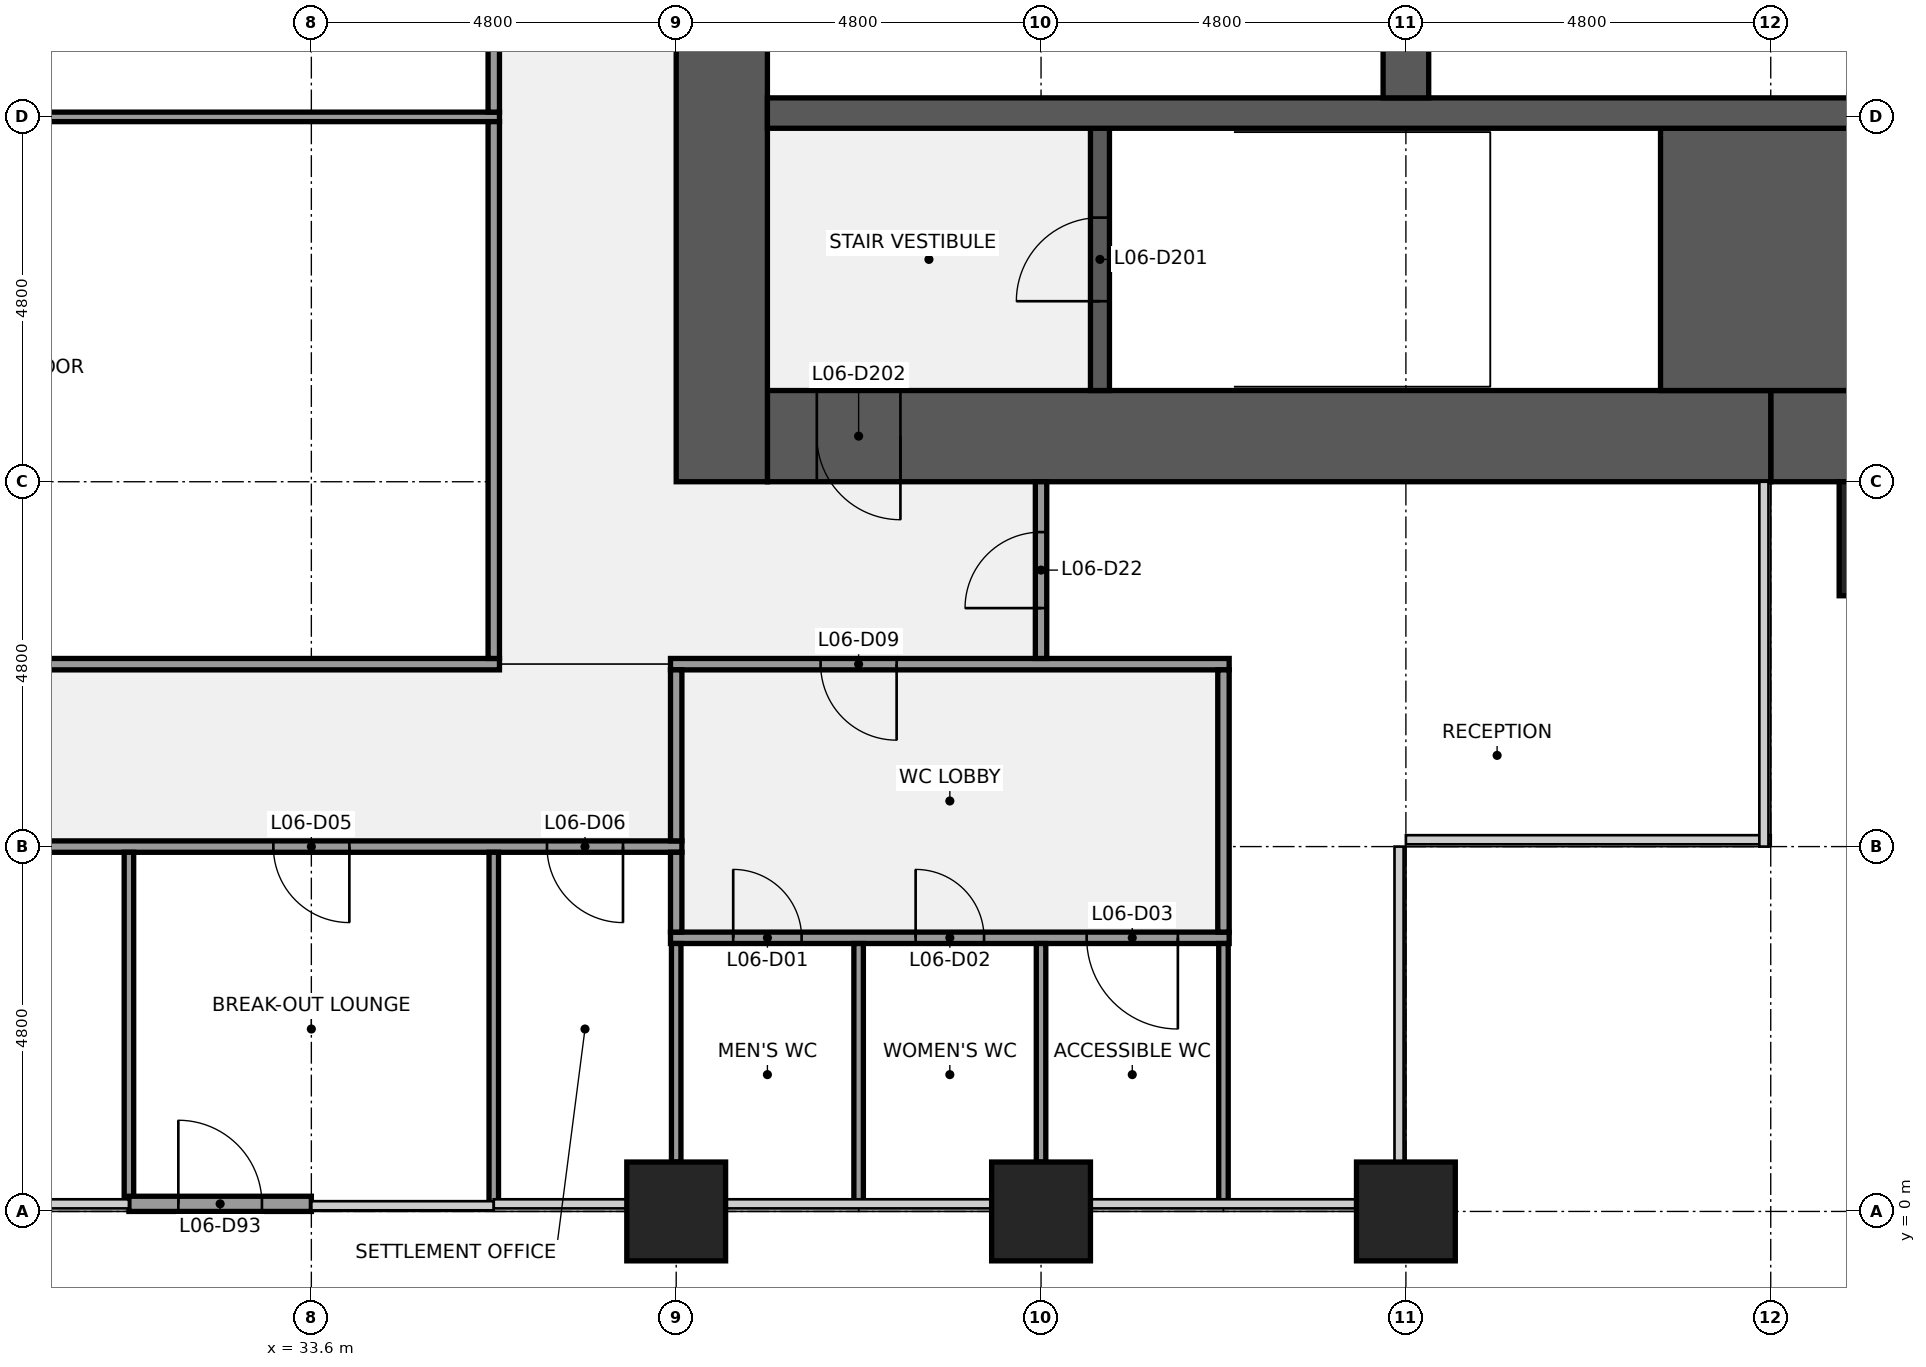
"""IFC4 building model, lengths in metres.
Left out: names, types, materials, properties, quantities, classifications, styles, units other than length and angle.
Written with IfcOpenShell. Run it as: python <this file> out.ifc"""

import sys

from ifc_helpers import new_model, si_unit, direction, frame, frame_2d, origin, origin_2d, place, context, subcontext, project, spatial, rectangle, extrude, element, fill, save


model = new_model("IFC4")
c1 = context("Model", 3, precision=1e-05, world=origin(), true_north=direction((0.0, 1.0)))
c2 = subcontext(c1, "Body", "Model", "MODEL_VIEW")
j1 = project(units=[si_unit("LENGTHUNIT", "METRE"), si_unit("PLANEANGLEUNIT", "RADIAN")], contexts=[c1])
p1 = place(None, origin())
s1 = spatial("IfcSite", under=j1, at=p1, CompositionType="ELEMENT")
p2 = place(p1, origin())
s2 = spatial("IfcBuilding", under=s1, at=p2, CompositionType="ELEMENT")
p3 = place(p2, frame((0.0, 0.0, 34.6)))
s3 = spatial("IfcBuildingStorey", under=s2, at=p3, CompositionType="ELEMENT", Elevation=34.6)
for number, where, z_axis, x_axis in (
    (1, (38.4, 0.0, 0.0), (0.0, 0.0, 1.0), (1.0, 0.0, 0.0)),
    (2, (43.2, 0.0, 0.0), (0.0, 0.0, 1.0), (1.0, 0.0, 0.0)),
    (3, (48.0, 0.0, 0.0), (0.0, 0.0, 1.0), (1.0, 0.0, 0.0)),
):
    element("IfcColumn", number, at=place(p3, frame(where, z_axis=z_axis, x_axis=x_axis)), inside=s3, PredefinedType="COLUMN", context=c2, shape_type="SweptSolid", body=[
        extrude(rectangle(XDim=1.3, YDim=1.3, at=origin_2d()), origin(), (0.0, 0.0, 1.0), 4.4),
    ])
p4 = place(p3, frame((56.4, 10.2, 0.0), z_axis=(0.0, 0.0, 1.0), x_axis=(-1.0, 0.0, 0.0)))
e4 = element("IfcWall", 4, at=p4, inside=s3, PredefinedType="SHEAR", context=c2, shape_type="SweptSolid", body=[
    extrude(rectangle(XDim=3.6, YDim=1.2, at=frame_2d((1.8, 0.0))), origin(), (0.0, 0.0, 1.0), 4.24),
])
p5 = place(p3, frame((52.8, 10.2, 0.0), z_axis=(0.0, 0.0, 1.0), x_axis=(-1.0, 0.0, 0.0)))
e5 = element("IfcWall", 5, at=p5, inside=s3, PredefinedType="SHEAR", context=c2, shape_type="SweptSolid", body=[
    extrude(rectangle(XDim=13.2, YDim=1.2, at=frame_2d((6.6, 0.0))), origin(), (0.0, 0.0, 1.0), 4.24),
])
p6 = place(p5, frame((11.45, 0.0, 0.0)))
e6 = element("IfcOpeningElement", 6, at=p6, cuts=e5, PredefinedType="OPENING", context=c2, shape_type="SweptSolid", body=[
    extrude(rectangle(XDim=1.1, YDim=2.1, at=frame_2d((0.55, 1.05))), frame((0.0, 0.61, 0.0), z_axis=(0.0, -1.0, 0.0), x_axis=(1.0, 0.0, 0.0)), (0.0, 0.0, 1.0), 1.22),
])
p7 = place(p3, frame((39.0, 9.6, 0.0), z_axis=(0.0, 0.0, 1.0), x_axis=(0.0, 1.0, 0.0)))
e7 = element("IfcWall", 7, at=p7, inside=s3, PredefinedType="SHEAR", context=c2, shape_type="SweptSolid", body=[
    extrude(rectangle(XDim=28.8, YDim=1.2, at=frame_2d((14.4, 0.0))), origin(), (0.0, 0.0, 1.0), 4.24),
])
p8 = place(p7, frame((8.7, 0.0, 0.0)))
e8 = element("IfcOpeningElement", 8, at=p8, cuts=e7, PredefinedType="OPENING", context=c2, shape_type="SweptSolid", body=[
    extrude(rectangle(XDim=1.8, YDim=2.1, at=frame_2d((0.9, 1.05))), frame((0.0, 0.61, 0.0), z_axis=(0.0, -1.0, 0.0), x_axis=(1.0, 0.0, 0.0)), (0.0, 0.0, 1.0), 1.22),
])
p9 = place(p7, frame((18.3, 0.0, 0.0)))
e9 = element("IfcOpeningElement", 9, at=p9, cuts=e7, PredefinedType="OPENING", context=c2, shape_type="SweptSolid", body=[
    extrude(rectangle(XDim=1.8, YDim=2.1, at=frame_2d((0.9, 1.05))), frame((0.0, 0.61, 0.0), z_axis=(0.0, -1.0, 0.0), x_axis=(1.0, 0.0, 0.0)), (0.0, 0.0, 1.0), 1.22),
])
p10 = place(p3, frame((51.35, 12.525, 0.0), z_axis=(0.0, 0.0, 1.0), x_axis=(1.0, 0.0, 0.0)))
e10 = element("IfcWall", 10, at=p10, inside=s3, PredefinedType="SHEAR", context=c2, shape_type="SweptSolid", body=[
    extrude(rectangle(XDim=5.05, YDim=3.45, at=frame_2d((2.525, 0.0))), origin(), (0.0, 0.0, 1.0), 4.24),
])
p11 = place(p3, frame((43.975, 10.8, 0.0), z_axis=(0.0, 0.0, 1.0), x_axis=(0.0, 1.0, 0.0)))
e11 = element("IfcWall", 11, at=p11, inside=s3, PredefinedType="SHEAR", context=c2, shape_type="SweptSolid", body=[
    extrude(rectangle(XDim=3.45, YDim=0.25, at=frame_2d((1.725, 0.0))), origin(), (0.0, 0.0, 1.0), 4.24),
])
p12 = place(p11, frame((1.175, 0.0, 0.0)))
e12 = element("IfcOpeningElement", 12, at=p12, cuts=e11, PredefinedType="OPENING", context=c2, shape_type="SweptSolid", body=[
    extrude(rectangle(XDim=1.1, YDim=2.1, at=frame_2d((0.55, 1.05))), frame((0.0, 0.135, 0.0), z_axis=(0.0, -1.0, 0.0), x_axis=(1.0, 0.0, 0.0)), (0.0, 0.0, 1.0), 0.27),
])
p13 = place(p3, frame((39.6, 14.45, 0.0), z_axis=(0.0, 0.0, 1.0), x_axis=(1.0, 0.0, 0.0)))
e13 = element("IfcWall", 13, at=p13, inside=s3, PredefinedType="SHEAR", context=c2, shape_type="SweptSolid", body=[
    extrude(rectangle(XDim=16.8, YDim=0.4, at=frame_2d((8.4, 0.0))), origin(), (0.0, 0.0, 1.0), 4.24),
])
p14 = place(p3, frame((48.0, 14.65, 0.0), z_axis=(0.0, 0.0, 1.0), x_axis=(0.0, 1.0, 0.0)))
e14 = element("IfcWall", 14, at=p14, inside=s3, PredefinedType="SHEAR", context=c2, shape_type="SweptSolid", body=[
    extrude(rectangle(XDim=2.6, YDim=0.6, at=frame_2d((1.3, 0.0))), origin(), (0.0, 0.0, 1.0), 4.24),
])
p15 = place(p3, frame((38.325, 3.6, 0.0), z_axis=(0.0, 0.0, 1.0), x_axis=(1.0, 0.0, 0.0)))
e15 = element("IfcWall", 15, at=p15, inside=s3, PredefinedType="PARTITIONING", context=c2, shape_type="SweptSolid", body=[
    extrude(rectangle(XDim=7.35, YDim=0.15, at=frame_2d((3.675, 0.0))), origin(), (0.0, 0.0, 1.0), 3.27),
])
p16 = place(p15, frame((0.825, 0.0, 0.0)))
e16 = element("IfcOpeningElement", 16, at=p16, cuts=e15, PredefinedType="OPENING", context=c2, shape_type="SweptSolid", body=[
    extrude(rectangle(XDim=0.9, YDim=2.1, at=frame_2d((0.45, 1.05))), frame((0.0, 0.085, 0.0), z_axis=(0.0, -1.0, 0.0), x_axis=(1.0, 0.0, 0.0)), (0.0, 0.0, 1.0), 0.17),
])
p17 = place(p15, frame((3.225, 0.0, 0.0)))
e17 = element("IfcOpeningElement", 17, at=p17, cuts=e15, PredefinedType="OPENING", context=c2, shape_type="SweptSolid", body=[
    extrude(rectangle(XDim=0.9, YDim=2.1, at=frame_2d((0.45, 1.05))), frame((0.0, 0.085, 0.0), z_axis=(0.0, -1.0, 0.0), x_axis=(1.0, 0.0, 0.0)), (0.0, 0.0, 1.0), 0.17),
])
p18 = place(p15, frame((5.475, 0.0, 0.0)))
e18 = element("IfcOpeningElement", 18, at=p18, cuts=e15, PredefinedType="OPENING", context=c2, shape_type="SweptSolid", body=[
    extrude(rectangle(XDim=1.2, YDim=2.1, at=frame_2d((0.6, 1.05))), frame((0.0, 0.085, 0.0), z_axis=(0.0, -1.0, 0.0), x_axis=(1.0, 0.0, 0.0)), (0.0, 0.0, 1.0), 0.17),
])
p19 = place(p3, frame((19.125, 4.8, 0.0), z_axis=(0.0, 0.0, 1.0), x_axis=(1.0, 0.0, 0.0)))
e19 = element("IfcWall", 19, at=p19, inside=s3, PredefinedType="PARTITIONING", context=c2, shape_type="SweptSolid", body=[
    extrude(rectangle(XDim=19.35, YDim=0.15, at=frame_2d((9.675, 0.0))), origin(), (0.0, 0.0, 1.0), 3.27),
])
p20 = place(p19, frame((5.575, 0.0, 0.0)))
e20 = element("IfcOpeningElement", 20, at=p20, cuts=e19, PredefinedType="OPENING", context=c2, shape_type="SweptSolid", body=[
    extrude(rectangle(XDim=1.0, YDim=2.1, at=frame_2d((0.5, 1.05))), frame((0.0, 0.085, 0.0), z_axis=(0.0, -1.0, 0.0), x_axis=(1.0, 0.0, 0.0)), (0.0, 0.0, 1.0), 0.17),
])
p21 = place(p19, frame((13.975, 0.0, 0.0)))
e21 = element("IfcOpeningElement", 21, at=p21, cuts=e19, PredefinedType="OPENING", context=c2, shape_type="SweptSolid", body=[
    extrude(rectangle(XDim=1.0, YDim=2.1, at=frame_2d((0.5, 1.05))), frame((0.0, 0.085, 0.0), z_axis=(0.0, -1.0, 0.0), x_axis=(1.0, 0.0, 0.0)), (0.0, 0.0, 1.0), 0.17),
])
p22 = place(p19, frame((17.575, 0.0, 0.0)))
e22 = element("IfcOpeningElement", 22, at=p22, cuts=e19, PredefinedType="OPENING", context=c2, shape_type="SweptSolid", body=[
    extrude(rectangle(XDim=1.0, YDim=2.1, at=frame_2d((0.5, 1.05))), frame((0.0, 0.085, 0.0), z_axis=(0.0, -1.0, 0.0), x_axis=(1.0, 0.0, 0.0)), (0.0, 0.0, 1.0), 0.17),
])
p23 = place(p3, frame((21.525, 7.2, 0.0), z_axis=(0.0, 0.0, 1.0), x_axis=(1.0, 0.0, 0.0)))
e23 = element("IfcWall", 23, at=p23, inside=s3, PredefinedType="PARTITIONING", context=c2, shape_type="SweptSolid", body=[
    extrude(rectangle(XDim=14.55, YDim=0.15, at=frame_2d((7.275, 0.0))), origin(), (0.0, 0.0, 1.0), 3.27),
])
p24 = place(p23, frame((6.775, 0.0, 0.0)))
e24 = element("IfcOpeningElement", 24, at=p24, cuts=e23, PredefinedType="OPENING", context=c2, shape_type="SweptSolid", body=[
    extrude(rectangle(XDim=1.0, YDim=2.1, at=frame_2d((0.5, 1.05))), frame((0.0, 0.085, 0.0), z_axis=(0.0, -1.0, 0.0), x_axis=(1.0, 0.0, 0.0)), (0.0, 0.0, 1.0), 0.17),
])
p25 = place(p3, frame((38.325, 7.2, 0.0), z_axis=(0.0, 0.0, 1.0), x_axis=(1.0, 0.0, 0.0)))
e25 = element("IfcWall", 25, at=p25, inside=s3, PredefinedType="PARTITIONING", context=c2, shape_type="SweptSolid", body=[
    extrude(rectangle(XDim=7.35, YDim=0.15, at=frame_2d((3.675, 0.0))), origin(), (0.0, 0.0, 1.0), 3.27),
])
p26 = place(p25, frame((1.975, 0.0, 0.0)))
e26 = element("IfcOpeningElement", 26, at=p26, cuts=e25, PredefinedType="OPENING", context=c2, shape_type="SweptSolid", body=[
    extrude(rectangle(XDim=1.0, YDim=2.1, at=frame_2d((0.5, 1.05))), frame((0.0, 0.085, 0.0), z_axis=(0.0, -1.0, 0.0), x_axis=(1.0, 0.0, 0.0)), (0.0, 0.0, 1.0), 0.17),
])
p27 = place(p3, frame((21.525, 14.4, 0.0), z_axis=(0.0, 0.0, 1.0), x_axis=(1.0, 0.0, 0.0)))
e27 = element("IfcWall", 27, at=p27, inside=s3, PredefinedType="PARTITIONING", context=c2, shape_type="SweptSolid", body=[
    extrude(rectangle(XDim=14.55, YDim=0.125, at=frame_2d((7.275, 0.0))), origin(), (0.0, 0.0, 1.0), 3.27),
])
for number, where, z_axis, x_axis in (
    (28, (31.2, 0.1, 0.0), (0.0, 0.0, 1.0), (0.0, 1.0, 0.0)),
    (29, (36.0, 0.1, 0.0), (0.0, 0.0, 1.0), (0.0, 1.0, 0.0)),
):
    element("IfcWall", number, at=place(p3, frame(where, z_axis=z_axis, x_axis=x_axis)), inside=s3, PredefinedType="PARTITIONING", context=c2, shape_type="SweptSolid", body=[
        extrude(rectangle(XDim=4.625, YDim=0.125, at=frame_2d((2.312, 0.0))), origin(), (0.0, 0.0, 1.0), 3.27),
    ])
p28 = place(p3, frame((36.0, 7.275, 0.0), z_axis=(0.0, 0.0, 1.0), x_axis=(0.0, 1.0, 0.0)))
e30 = element("IfcWall", 30, at=p28, inside=s3, PredefinedType="PARTITIONING", context=c2, shape_type="SweptSolid", body=[
    extrude(rectangle(XDim=7.062, YDim=0.15, at=frame_2d((3.531, 0.0))), origin(), (0.0, 0.0, 1.0), 3.27),
])
p29 = place(p3, frame((36.0, 14.462, 0.0), z_axis=(0.0, 0.0, 1.0), x_axis=(0.0, 1.0, 0.0)))
e31 = element("IfcWall", 31, at=p29, inside=s3, PredefinedType="PARTITIONING", context=c2, shape_type="SweptSolid", body=[
    extrude(rectangle(XDim=9.475, YDim=0.15, at=frame_2d((4.738, 0.0))), origin(), (0.0, 0.0, 1.0), 3.27),
])
p30 = place(p3, frame((38.4, 0.65, 0.0), z_axis=(0.0, 0.0, 1.0), x_axis=(0.0, 1.0, 0.0)))
e32 = element("IfcWall", 32, at=p30, inside=s3, PredefinedType="PARTITIONING", context=c2, shape_type="SweptSolid", body=[
    extrude(rectangle(XDim=2.875, YDim=0.125, at=frame_2d((1.438, 0.0))), origin(), (0.0, 0.0, 1.0), 3.27),
])
p31 = place(p3, frame((38.4, 3.675, 0.0), z_axis=(0.0, 0.0, 1.0), x_axis=(0.0, 1.0, 0.0)))
e33 = element("IfcWall", 33, at=p31, inside=s3, PredefinedType="PARTITIONING", context=c2, shape_type="SweptSolid", body=[
    extrude(rectangle(XDim=1.05, YDim=0.15, at=frame_2d((0.525, 0.0))), origin(), (0.0, 0.0, 1.0), 3.27),
])
p32 = place(p3, frame((38.4, 4.875, 0.0), z_axis=(0.0, 0.0, 1.0), x_axis=(0.0, 1.0, 0.0)))
e34 = element("IfcWall", 34, at=p32, inside=s3, PredefinedType="PARTITIONING", context=c2, shape_type="SweptSolid", body=[
    extrude(rectangle(XDim=2.25, YDim=0.15, at=frame_2d((1.125, 0.0))), origin(), (0.0, 0.0, 1.0), 3.27),
])
p33 = place(p3, frame((40.8, 0.1, 0.0), z_axis=(0.0, 0.0, 1.0), x_axis=(0.0, 1.0, 0.0)))
e35 = element("IfcWall", 35, at=p33, inside=s3, PredefinedType="PARTITIONING", context=c2, shape_type="SweptSolid", body=[
    extrude(rectangle(XDim=3.425, YDim=0.125, at=frame_2d((1.712, 0.0))), origin(), (0.0, 0.0, 1.0), 3.27),
])
p34 = place(p3, frame((43.2, 0.65, 0.0), z_axis=(0.0, 0.0, 1.0), x_axis=(0.0, 1.0, 0.0)))
e36 = element("IfcWall", 36, at=p34, inside=s3, PredefinedType="PARTITIONING", context=c2, shape_type="SweptSolid", body=[
    extrude(rectangle(XDim=2.875, YDim=0.125, at=frame_2d((1.438, 0.0))), origin(), (0.0, 0.0, 1.0), 3.27),
])
p35 = place(p3, frame((43.2, 7.275, 0.0), z_axis=(0.0, 0.0, 1.0), x_axis=(0.0, 1.0, 0.0)))
e37 = element("IfcWall", 37, at=p35, inside=s3, PredefinedType="PARTITIONING", context=c2, shape_type="SweptSolid", body=[
    extrude(rectangle(XDim=2.325, YDim=0.15, at=frame_2d((1.163, 0.0))), origin(), (0.0, 0.0, 1.0), 3.27),
])
p36 = place(p35, frame((0.663, 0.0, 0.0)))
e38 = element("IfcOpeningElement", 38, at=p36, cuts=e37, PredefinedType="OPENING", context=c2, shape_type="SweptSolid", body=[
    extrude(rectangle(XDim=1.0, YDim=2.1, at=frame_2d((0.5, 1.05))), frame((0.0, 0.085, 0.0), z_axis=(0.0, -1.0, 0.0), x_axis=(1.0, 0.0, 0.0)), (0.0, 0.0, 1.0), 0.17),
])
p37 = place(p3, frame((45.6, 0.1, 0.0), z_axis=(0.0, 0.0, 1.0), x_axis=(0.0, 1.0, 0.0)))
e39 = element("IfcWall", 39, at=p37, inside=s3, PredefinedType="PARTITIONING", context=c2, shape_type="SweptSolid", body=[
    extrude(rectangle(XDim=3.425, YDim=0.125, at=frame_2d((1.712, 0.0))), origin(), (0.0, 0.0, 1.0), 3.27),
])
p38 = place(p3, frame((45.6, 3.675, 0.0), z_axis=(0.0, 0.0, 1.0), x_axis=(0.0, 1.0, 0.0)))
e40 = element("IfcWall", 40, at=p38, inside=s3, PredefinedType="PARTITIONING", context=c2, shape_type="SweptSolid", body=[
    extrude(rectangle(XDim=3.45, YDim=0.15, at=frame_2d((1.725, 0.0))), origin(), (0.0, 0.0, 1.0), 3.27),
])
p39 = place(p3, frame((55.2, 8.85, 0.0), z_axis=(0.0, 0.0, 1.0), x_axis=(1.0, 0.0, 0.0)))
e41 = element("IfcColumn", 41, at=p39, inside=s3, PredefinedType="PILASTER", context=c2, shape_type="SweptSolid", body=[
    extrude(rectangle(XDim=3.0, YDim=1.5, at=origin_2d()), origin(), (0.0, 0.0, 1.0), 4.4),
])
p40 = place(p3, frame((31.2, 0.1, 0.0), z_axis=(0.0, 0.0, 1.0), x_axis=(1.0, 0.0, 0.0)))
e42 = element("IfcWall", 42, at=p40, inside=s3, PredefinedType="SOLIDWALL", context=c2, shape_type="SweptSolid", body=[
    extrude(rectangle(XDim=2.4, YDim=0.2, at=frame_2d((1.2, 0.0))), origin(), (0.0, 0.0, 1.0), 3.714),
])
p41 = place(p40, frame((0.65, 0.0, 0.0)))
e43 = element("IfcOpeningElement", 43, at=p41, cuts=e42, PredefinedType="OPENING", context=c2, shape_type="SweptSolid", body=[
    extrude(rectangle(XDim=1.1, YDim=2.1, at=frame_2d((0.55, 1.05))), frame((0.0, 0.11, 0.0), z_axis=(0.0, -1.0, 0.0), x_axis=(1.0, 0.0, 0.0)), (0.0, 0.0, 1.0), 0.22),
])
for number, where, z_axis, x_axis in (
    (44, (38.4, -1.075, 0.0), (0.0, 0.0, 1.0), (1.0, 0.0, 0.0)),
    (45, (43.2, -1.075, 0.0), (0.0, 0.0, 1.0), (1.0, 0.0, 0.0)),
    (46, (48.0, -1.075, 0.0), (0.0, 0.0, 1.0), (1.0, 0.0, 0.0)),
):
    element("IfcColumn", number, at=place(p3, frame(where, z_axis=z_axis, x_axis=x_axis)), inside=s3, PredefinedType="PILASTER", context=c2, shape_type="SweptSolid", body=[
        extrude(rectangle(XDim=4.2, YDim=0.85, at=origin_2d()), origin(), (0.0, 0.0, 1.0), 4.4),
    ])
p42 = place(p12, origin())
e47 = element("IfcDoor", 47, at=p42, inside=s3, OperationType="SINGLE_SWING_LEFT", PredefinedType="DOOR", context=c2, shape_type="SweptSolid", body=[
    extrude(rectangle(XDim=1.1, YDim=2.1, at=frame_2d((0.55, 1.05))), frame((0.0, 0.025, 0.0), z_axis=(0.0, -1.0, 0.0), x_axis=(1.0, 0.0, 0.0)), (0.0, 0.0, 1.0), 0.05),
])
fill(e12, e47)
p43 = place(p6, origin())
e48 = element("IfcDoor", 48, at=p43, inside=s3, OperationType="SINGLE_SWING_LEFT", PredefinedType="DOOR", context=c2, shape_type="SweptSolid", body=[
    extrude(rectangle(XDim=1.1, YDim=2.1, at=frame_2d((0.55, 1.05))), frame((0.0, 0.025, 0.0), z_axis=(0.0, -1.0, 0.0), x_axis=(1.0, 0.0, 0.0)), (0.0, 0.0, 1.0), 0.05),
])
fill(e6, e48)
p44 = place(p16, origin())
e49 = element("IfcDoor", 49, at=p44, inside=s3, OperationType="SINGLE_SWING_LEFT", PredefinedType="DOOR", context=c2, shape_type="SweptSolid", body=[
    extrude(rectangle(XDim=0.9, YDim=2.1, at=frame_2d((0.45, 1.05))), frame((0.0, 0.025, 0.0), z_axis=(0.0, -1.0, 0.0), x_axis=(1.0, 0.0, 0.0)), (0.0, 0.0, 1.0), 0.05),
])
fill(e16, e49)
p45 = place(p17, origin())
e50 = element("IfcDoor", 50, at=p45, inside=s3, OperationType="SINGLE_SWING_LEFT", PredefinedType="DOOR", context=c2, shape_type="SweptSolid", body=[
    extrude(rectangle(XDim=0.9, YDim=2.1, at=frame_2d((0.45, 1.05))), frame((0.0, 0.025, 0.0), z_axis=(0.0, -1.0, 0.0), x_axis=(1.0, 0.0, 0.0)), (0.0, 0.0, 1.0), 0.05),
])
fill(e17, e50)
p46 = place(p18, origin())
e51 = element("IfcDoor", 51, at=p46, inside=s3, OperationType="SINGLE_SWING_RIGHT", PredefinedType="DOOR", context=c2, shape_type="SweptSolid", body=[
    extrude(rectangle(XDim=1.2, YDim=2.1, at=frame_2d((0.6, 1.05))), frame((0.0, 0.025, 0.0), z_axis=(0.0, -1.0, 0.0), x_axis=(1.0, 0.0, 0.0)), (0.0, 0.0, 1.0), 0.05),
])
fill(e18, e51)
p47 = place(p21, origin())
e52 = element("IfcDoor", 52, at=p47, inside=s3, OperationType="SINGLE_SWING_RIGHT", PredefinedType="DOOR", context=c2, shape_type="SweptSolid", body=[
    extrude(rectangle(XDim=1.0, YDim=2.1, at=frame_2d((0.5, 1.05))), frame((0.0, 0.025, 0.0), z_axis=(0.0, -1.0, 0.0), x_axis=(1.0, 0.0, 0.0)), (0.0, 0.0, 1.0), 0.05),
])
fill(e21, e52)
p48 = place(p22, origin())
e53 = element("IfcDoor", 53, at=p48, inside=s3, OperationType="SINGLE_SWING_RIGHT", PredefinedType="DOOR", context=c2, shape_type="SweptSolid", body=[
    extrude(rectangle(XDim=1.0, YDim=2.1, at=frame_2d((0.5, 1.05))), frame((0.0, 0.025, 0.0), z_axis=(0.0, -1.0, 0.0), x_axis=(1.0, 0.0, 0.0)), (0.0, 0.0, 1.0), 0.05),
])
fill(e22, e53)
p49 = place(p26, origin())
e54 = element("IfcDoor", 54, at=p49, inside=s3, OperationType="SINGLE_SWING_RIGHT", PredefinedType="DOOR", context=c2, shape_type="SweptSolid", body=[
    extrude(rectangle(XDim=1.0, YDim=2.1, at=frame_2d((0.5, 1.05))), frame((0.0, 0.025, 0.0), z_axis=(0.0, -1.0, 0.0), x_axis=(1.0, 0.0, 0.0)), (0.0, 0.0, 1.0), 0.05),
])
fill(e26, e54)
p50 = place(p36, origin())
e55 = element("IfcDoor", 55, at=p50, inside=s3, OperationType="SINGLE_SWING_LEFT", PredefinedType="DOOR", context=c2, shape_type="SweptSolid", body=[
    extrude(rectangle(XDim=1.0, YDim=2.1, at=frame_2d((0.5, 1.05))), frame((0.0, 0.025, 0.0), z_axis=(0.0, -1.0, 0.0), x_axis=(1.0, 0.0, 0.0)), (0.0, 0.0, 1.0), 0.05),
])
fill(e38, e55)
p51 = place(p41, origin())
e56 = element("IfcDoor", 56, at=p51, inside=s3, OperationType="SINGLE_SWING_LEFT", PredefinedType="DOOR", context=c2, shape_type="SweptSolid", body=[
    extrude(rectangle(XDim=1.1, YDim=2.1, at=frame_2d((0.55, 1.05))), frame((0.0, 0.025, 0.0), z_axis=(0.0, -1.0, 0.0), x_axis=(1.0, 0.0, 0.0)), (0.0, 0.0, 1.0), 0.05),
])
fill(e43, e56)
save(model, sys.argv[1])
